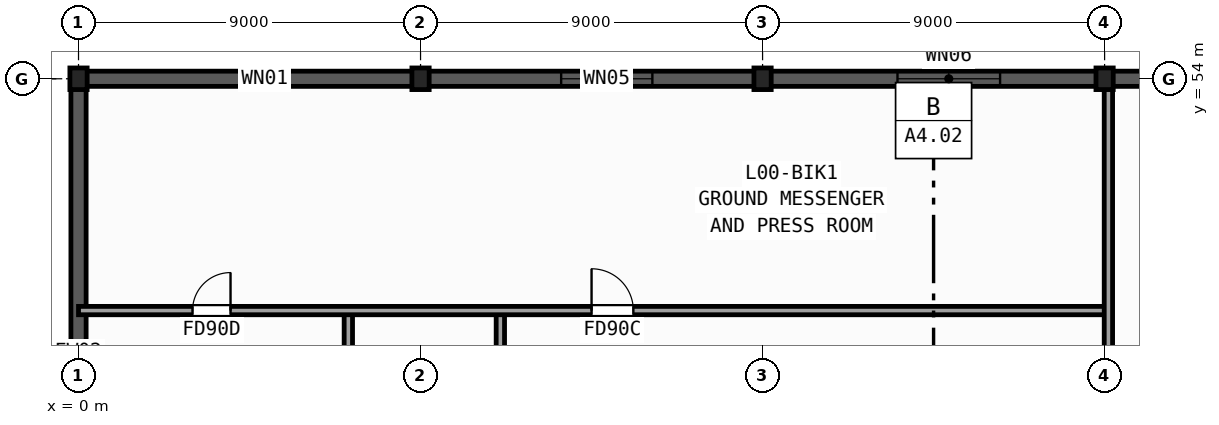
"""IFC4 building model, lengths in metres.
Left out: names, types, materials, properties, quantities, classifications, styles, units other than length and angle.
Written with IfcOpenShell. Run it as: python <this file> out.ifc"""

import sys

from ifc_helpers import new_model, si_unit, direction, frame, frame_2d, origin, origin_2d, place, context, subcontext, project, spatial, rectangle, i_section, extrude, element, fill, save


model = new_model("IFC4")
c1 = context("Model", 3, precision=1e-05, world=origin(), true_north=direction((0.0, 1.0)))
c2 = subcontext(c1, "Body", "Model", "MODEL_VIEW")
j1 = project(units=[si_unit("LENGTHUNIT", "METRE"), si_unit("PLANEANGLEUNIT", "RADIAN")], contexts=[c1])
p1 = place(None, origin())
s1 = spatial("IfcSite", under=j1, at=p1, CompositionType="ELEMENT")
p2 = place(p1, origin())
s2 = spatial("IfcBuilding", under=s1, at=p2, CompositionType="ELEMENT")
p3 = place(p2, origin())
s3 = spatial("IfcBuildingStorey", under=s2, at=p3, CompositionType="ELEMENT", Elevation=0.0)
for number, where, z_axis, x_axis in (
    (1, (0.0, 54.0, 0.0), (0.0, 0.0, 1.0), (1.0, 0.0, 0.0)),
    (2, (9.0, 54.0, 0.0), (0.0, 0.0, 1.0), (1.0, 0.0, 0.0)),
    (3, (18.0, 54.0, 0.0), (0.0, 0.0, 1.0), (1.0, 0.0, 0.0)),
    (4, (27.0, 54.0, 0.0), (0.0, 0.0, 1.0), (1.0, 0.0, 0.0)),
):
    element("IfcColumn", number, at=place(p3, frame(where, z_axis=z_axis, x_axis=x_axis)), inside=s3, PredefinedType="COLUMN", context=c2, shape_type="SweptSolid", body=[
        extrude(i_section(OverallWidth=0.454, OverallDepth=0.569, WebThickness=0.078, FlangeThickness=0.125, FilletRadius=0.015, at=origin_2d()), origin(), (0.0, 0.0, 1.0), 5.8),
    ])
p4 = place(p3, frame((0.0, -0.2, 0.0), z_axis=(0.0, 0.0, 1.0), x_axis=(0.0, 1.0, 0.0)))
e5 = element("IfcWall", 5, at=p4, inside=s3, PredefinedType="SOLIDWALL", context=c2, shape_type="SweptSolid", body=[
    extrude(rectangle(XDim=54.4, YDim=0.4, at=frame_2d((27.2, 0.0))), origin(), (0.0, 0.0, 1.0), 5.48),
])
p5 = place(p4, frame((37.4, 0.0, 0.0)))
e6 = element("IfcOpeningElement", 6, at=p5, cuts=e5, PredefinedType="OPENING", context=c2, shape_type="SweptSolid", body=[
    extrude(rectangle(XDim=1.9, YDim=2.2, at=frame_2d((0.95, 1.1))), frame((0.0, 0.21, 0.0), z_axis=(0.0, -1.0, 0.0), x_axis=(1.0, 0.0, 0.0)), (0.0, 0.0, 1.0), 0.42),
])
p6 = place(p4, frame((19.4, 0.0, 0.0)))
e7 = element("IfcOpeningElement", 7, at=p6, cuts=e5, PredefinedType="OPENING", context=c2, shape_type="SweptSolid", body=[
    extrude(rectangle(XDim=1.6, YDim=2.2, at=frame_2d((0.8, 1.1))), frame((0.0, 0.21, 0.0), z_axis=(0.0, -1.0, 0.0), x_axis=(1.0, 0.0, 0.0)), (0.0, 0.0, 1.0), 0.42),
])
p7 = place(p4, frame((3.6, 0.0, 0.0)))
e8 = element("IfcOpeningElement", 8, at=p7, cuts=e5, PredefinedType="OPENING", context=c2, shape_type="SweptSolid", body=[
    extrude(rectangle(XDim=2.1, YDim=2.4, at=frame_2d((1.05, 1.2))), frame((0.0, 0.21, 0.0), z_axis=(0.0, -1.0, 0.0), x_axis=(1.0, 0.0, 0.0)), (0.0, 0.0, 1.0), 0.42),
])
p8 = place(p4, frame((12.6, 0.0, 0.0)))
e9 = element("IfcOpeningElement", 9, at=p8, cuts=e5, PredefinedType="OPENING", context=c2, shape_type="SweptSolid", body=[
    extrude(rectangle(XDim=2.1, YDim=2.4, at=frame_2d((1.05, 1.2))), frame((0.0, 0.21, 0.0), z_axis=(0.0, -1.0, 0.0), x_axis=(1.0, 0.0, 0.0)), (0.0, 0.0, 1.0), 0.42),
])
p9 = place(p4, frame((21.6, 0.0, 0.0)))
e10 = element("IfcOpeningElement", 10, at=p9, cuts=e5, PredefinedType="OPENING", context=c2, shape_type="SweptSolid", body=[
    extrude(rectangle(XDim=2.1, YDim=2.4, at=frame_2d((1.05, 1.2))), frame((0.0, 0.21, 0.0), z_axis=(0.0, -1.0, 0.0), x_axis=(1.0, 0.0, 0.0)), (0.0, 0.0, 1.0), 0.42),
])
p10 = place(p4, frame((31.4, 0.0, 0.0)))
e11 = element("IfcOpeningElement", 11, at=p10, cuts=e5, PredefinedType="OPENING", context=c2, shape_type="SweptSolid", body=[
    extrude(rectangle(XDim=1.6, YDim=2.2, at=frame_2d((0.8, 1.1))), frame((0.0, 0.21, 0.0), z_axis=(0.0, -1.0, 0.0), x_axis=(1.0, 0.0, 0.0)), (0.0, 0.0, 1.0), 0.42),
])
p11 = place(p3, frame((0.2, 54.0, 0.0), z_axis=(0.0, 0.0, 1.0), x_axis=(1.0, 0.0, 0.0)))
e12 = element("IfcWall", 12, at=p11, inside=s3, PredefinedType="SOLIDWALL", context=c2, shape_type="SweptSolid", body=[
    extrude(rectangle(XDim=62.6, YDim=0.4, at=frame_2d((31.3, 0.0))), origin(), (0.0, 0.0, 1.0), 5.48),
])
p12 = place(p11, frame((4.1, 0.0, 1.1)))
e13 = element("IfcOpeningElement", 13, at=p12, cuts=e12, PredefinedType="OPENING", context=c2, shape_type="SweptSolid", body=[
    extrude(rectangle(XDim=1.2, YDim=1.5, at=frame_2d((0.6, 0.75))), frame((0.0, 0.21, 0.0), z_axis=(0.0, -1.0, 0.0), x_axis=(1.0, 0.0, 0.0)), (0.0, 0.0, 1.0), 0.42),
])
p13 = place(p11, frame((12.5, 0.0, 1.1)))
e14 = element("IfcOpeningElement", 14, at=p13, cuts=e12, PredefinedType="OPENING", context=c2, shape_type="SweptSolid", body=[
    extrude(rectangle(XDim=2.4, YDim=1.95, at=frame_2d((1.2, 0.975))), frame((0.0, 0.21, 0.0), z_axis=(0.0, -1.0, 0.0), x_axis=(1.0, 0.0, 0.0)), (0.0, 0.0, 1.0), 0.42),
])
p14 = place(p11, frame((21.35, 0.0, 1.1)))
e15 = element("IfcOpeningElement", 15, at=p14, cuts=e12, PredefinedType="OPENING", context=c2, shape_type="SweptSolid", body=[
    extrude(rectangle(XDim=2.7, YDim=2.1, at=frame_2d((1.35, 1.05))), frame((0.0, 0.21, 0.0), z_axis=(0.0, -1.0, 0.0), x_axis=(1.0, 0.0, 0.0)), (0.0, 0.0, 1.0), 0.42),
])
p15 = place(p11, frame((30.2, 0.0, 1.1)))
e16 = element("IfcOpeningElement", 16, at=p15, cuts=e12, PredefinedType="OPENING", context=c2, shape_type="SweptSolid", body=[
    extrude(rectangle(XDim=3.0, YDim=2.25, at=frame_2d((1.5, 1.125))), frame((0.0, 0.21, 0.0), z_axis=(0.0, -1.0, 0.0), x_axis=(1.0, 0.0, 0.0)), (0.0, 0.0, 1.0), 0.42),
])
p16 = place(p11, frame((48.575, 0.0, 1.1)))
e17 = element("IfcOpeningElement", 17, at=p16, cuts=e12, PredefinedType="OPENING", context=c2, shape_type="SweptSolid", body=[
    extrude(rectangle(XDim=2.25, YDim=2.1, at=frame_2d((1.125, 1.05))), frame((0.0, 0.21, 0.0), z_axis=(0.0, -1.0, 0.0), x_axis=(1.0, 0.0, 0.0)), (0.0, 0.0, 1.0), 0.42),
])
p17 = place(p11, frame((57.425, 0.0, 1.1)))
e18 = element("IfcOpeningElement", 18, at=p17, cuts=e12, PredefinedType="OPENING", context=c2, shape_type="SweptSolid", body=[
    extrude(rectangle(XDim=2.55, YDim=2.25, at=frame_2d((1.275, 1.125))), frame((0.0, 0.21, 0.0), z_axis=(0.0, -1.0, 0.0), x_axis=(1.0, 0.0, 0.0)), (0.0, 0.0, 1.0), 0.42),
])
p18 = place(p3, frame((7.1, 39.35, 0.0), z_axis=(0.0, 0.0, 1.0), x_axis=(0.0, 1.0, 0.0)))
e19 = element("IfcWall", 19, at=p18, inside=s3, PredefinedType="PARTITIONING", context=c2, shape_type="SweptSolid", body=[
    extrude(rectangle(XDim=8.55, YDim=0.22, at=frame_2d((4.275, 0.0))), origin(), (0.0, 0.0, 1.0), 4.533),
])
p19 = place(p18, frame((5.2, 0.0, 0.0)))
e20 = element("IfcOpeningElement", 20, at=p19, cuts=e19, PredefinedType="OPENING", context=c2, shape_type="SweptSolid", body=[
    extrude(rectangle(XDim=1.0, YDim=2.15, at=frame_2d((0.5, 1.075))), frame((0.0, 0.12, 0.0), z_axis=(0.0, -1.0, 0.0), x_axis=(1.0, 0.0, 0.0)), (0.0, 0.0, 1.0), 0.24),
])
p20 = place(p3, frame((11.1, 42.4, 0.0), z_axis=(0.0, 0.0, 1.0), x_axis=(0.0, 1.0, 0.0)))
e21 = element("IfcWall", 21, at=p20, inside=s3, PredefinedType="PARTITIONING", context=c2, shape_type="SweptSolid", body=[
    extrude(rectangle(XDim=5.5, YDim=0.22, at=frame_2d((2.75, 0.0))), origin(), (0.0, 0.0, 1.0), 4.533),
])
p21 = place(p20, frame((1.8, 0.0, 0.0)))
e22 = element("IfcOpeningElement", 22, at=p21, cuts=e21, PredefinedType="OPENING", context=c2, shape_type="SweptSolid", body=[
    extrude(rectangle(XDim=0.9, YDim=2.1, at=frame_2d((0.45, 1.05))), frame((0.0, 0.12, 0.0), z_axis=(0.0, -1.0, 0.0), x_axis=(1.0, 0.0, 0.0)), (0.0, 0.0, 1.0), 0.24),
])
p22 = place(p3, frame((0.0, 47.9, 0.0), z_axis=(0.0, 0.0, 1.0), x_axis=(1.0, 0.0, 0.0)))
e23 = element("IfcWall", 23, at=p22, inside=s3, PredefinedType="PARTITIONING", context=c2, shape_type="SweptSolid", body=[
    extrude(rectangle(XDim=27.1, YDim=0.22, at=frame_2d((13.55, 0.0))), origin(), (0.0, 0.0, 1.0), 4.605),
])
p23 = place(p22, frame((13.5, 0.0, 0.0)))
e24 = element("IfcOpeningElement", 24, at=p23, cuts=e23, PredefinedType="OPENING", context=c2, shape_type="SweptSolid", body=[
    extrude(rectangle(XDim=1.1, YDim=2.15, at=frame_2d((0.55, 1.075))), frame((0.0, 0.12, 0.0), z_axis=(0.0, -1.0, 0.0), x_axis=(1.0, 0.0, 0.0)), (0.0, 0.0, 1.0), 0.24),
])
p24 = place(p22, frame((3.0, 0.0, 0.0)))
e25 = element("IfcOpeningElement", 25, at=p24, cuts=e23, PredefinedType="OPENING", context=c2, shape_type="SweptSolid", body=[
    extrude(rectangle(XDim=1.0, YDim=2.15, at=frame_2d((0.5, 1.075))), frame((0.0, 0.12, 0.0), z_axis=(0.0, -1.0, 0.0), x_axis=(1.0, 0.0, 0.0)), (0.0, 0.0, 1.0), 0.24),
])
p25 = place(p3, frame((27.1, 26.95, 0.0), z_axis=(0.0, 0.0, 1.0), x_axis=(0.0, 1.0, 0.0)))
e26 = element("IfcWall", 26, at=p25, inside=s3, PredefinedType="PARTITIONING", context=c2, shape_type="SweptSolid", body=[
    extrude(rectangle(XDim=27.05, YDim=0.22, at=frame_2d((13.525, 0.0))), origin(), (0.0, 0.0, 1.0), 4.533),
])
p26 = place(p12, origin())
e27 = element("IfcWindow", 27, at=p26, inside=s3, PartitioningType="SINGLE_PANEL", PredefinedType="WINDOW", context=c2, shape_type="SweptSolid", body=[
    extrude(rectangle(XDim=1.2, YDim=1.5, at=frame_2d((0.6, 0.75))), frame((0.0, 0.03, 0.0), z_axis=(0.0, -1.0, 0.0), x_axis=(1.0, 0.0, 0.0)), (0.0, 0.0, 1.0), 0.06),
])
fill(e13, e27)
p27 = place(p13, origin())
e28 = element("IfcWindow", 28, at=p27, inside=s3, PartitioningType="SINGLE_PANEL", PredefinedType="WINDOW", context=c2, shape_type="SweptSolid", body=[
    extrude(rectangle(XDim=2.4, YDim=1.95, at=frame_2d((1.2, 0.975))), frame((0.0, 0.03, 0.0), z_axis=(0.0, -1.0, 0.0), x_axis=(1.0, 0.0, 0.0)), (0.0, 0.0, 1.0), 0.06),
])
fill(e14, e28)
p28 = place(p14, origin())
e29 = element("IfcWindow", 29, at=p28, inside=s3, PartitioningType="SINGLE_PANEL", PredefinedType="WINDOW", context=c2, shape_type="SweptSolid", body=[
    extrude(rectangle(XDim=2.7, YDim=2.1, at=frame_2d((1.35, 1.05))), frame((0.0, 0.03, 0.0), z_axis=(0.0, -1.0, 0.0), x_axis=(1.0, 0.0, 0.0)), (0.0, 0.0, 1.0), 0.06),
])
fill(e15, e29)
p29 = place(p23, origin())
e30 = element("IfcDoor", 30, at=p29, inside=s3, OperationType="SINGLE_SWING_LEFT", PredefinedType="DOOR", context=c2, shape_type="SweptSolid", body=[
    extrude(rectangle(XDim=1.1, YDim=2.15, at=frame_2d((0.55, 1.075))), frame((0.0, 0.025, 0.0), z_axis=(0.0, -1.0, 0.0), x_axis=(1.0, 0.0, 0.0)), (0.0, 0.0, 1.0), 0.05),
])
fill(e24, e30)
p30 = place(p24, origin())
e31 = element("IfcDoor", 31, at=p30, inside=s3, OperationType="SINGLE_SWING_RIGHT", PredefinedType="DOOR", context=c2, shape_type="SweptSolid", body=[
    extrude(rectangle(XDim=1.0, YDim=2.15, at=frame_2d((0.5, 1.075))), frame((0.0, 0.025, 0.0), z_axis=(0.0, -1.0, 0.0), x_axis=(1.0, 0.0, 0.0)), (0.0, 0.0, 1.0), 0.05),
])
fill(e25, e31)
save(model, sys.argv[1])
